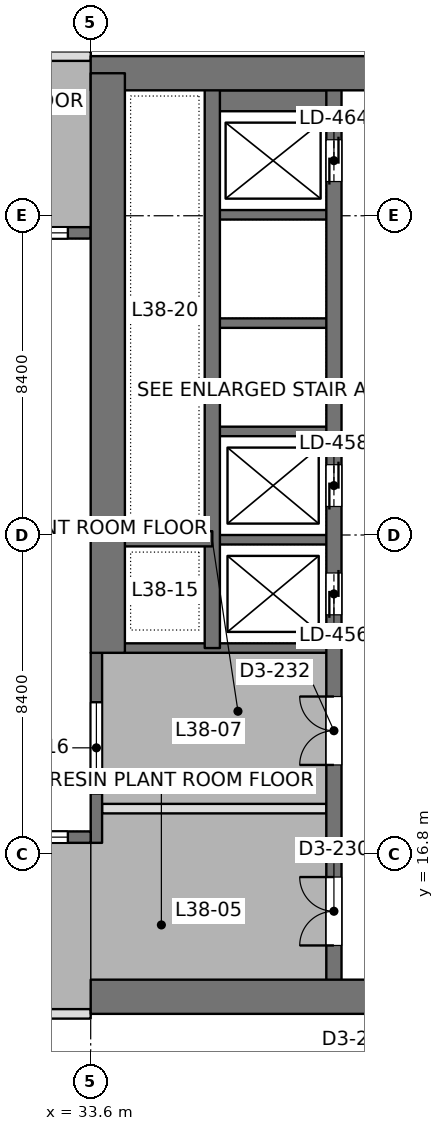
"""IFC4 building model, lengths in metres.
Left out: names, types, materials, properties, quantities, classifications, styles, units other than length and angle.
Written with IfcOpenShell. Run it as: python <this file> out.ifc"""

import sys

from ifc_helpers import new_model, si_unit, direction, frame, frame_2d, origin, place, context, subcontext, project, spatial, rectangle, extrude, element, fill, save


model = new_model("IFC4")
c1 = context("Model", 3, precision=1e-05, world=origin(), true_north=direction((0.0, 1.0)))
c2 = subcontext(c1, "Body", "Model", "MODEL_VIEW")
j1 = project(units=[si_unit("LENGTHUNIT", "METRE"), si_unit("PLANEANGLEUNIT", "RADIAN")], contexts=[c1])
p1 = place(None, origin())
s1 = spatial("IfcSite", under=j1, at=p1, CompositionType="ELEMENT")
p2 = place(p1, origin())
s2 = spatial("IfcBuilding", under=s1, at=p2, CompositionType="ELEMENT")
p3 = place(p2, frame((0.0, 0.0, 168.0)))
s3 = spatial("IfcBuildingStorey", under=s2, at=p3, CompositionType="ELEMENT", Elevation=168.0)
p4 = place(p3, frame((33.6, 13.05, 0.0), z_axis=(0.0, 0.0, 1.0), x_axis=(1.0, 0.0, 0.0)))
e1 = element("IfcWall", 1, at=p4, inside=s3, PredefinedType="SHEAR", context=c2, shape_type="SweptSolid", body=[
    extrude(rectangle(XDim=18.0, YDim=0.9, at=frame_2d((9.0, 0.0))), origin(), (0.0, 0.0, 1.0), 5.4),
])
p5 = place(p4, frame((7.25, 0.0, 0.0)))
e2 = element("IfcOpeningElement", 2, at=p5, cuts=e1, PredefinedType="OPENING", context=c2, shape_type="SweptSolid", body=[
    extrude(rectangle(XDim=1.8, YDim=2.4, at=frame_2d((0.9, 1.2))), frame((0.0, 0.46, 0.0), z_axis=(0.0, -1.0, 0.0), x_axis=(1.0, 0.0, 0.0)), (0.0, 0.0, 1.0), 0.92),
])
p6 = place(p3, frame((33.6, 37.35, 0.0), z_axis=(0.0, 0.0, 1.0), x_axis=(1.0, 0.0, 0.0)))
e3 = element("IfcWall", 3, at=p6, inside=s3, PredefinedType="SHEAR", context=c2, shape_type="SweptSolid", body=[
    extrude(rectangle(XDim=18.0, YDim=0.9, at=frame_2d((9.0, 0.0))), origin(), (0.0, 0.0, 1.0), 5.4),
])
p7 = place(p6, frame((7.25, 0.0, 0.0)))
e4 = element("IfcOpeningElement", 4, at=p7, cuts=e3, PredefinedType="OPENING", context=c2, shape_type="SweptSolid", body=[
    extrude(rectangle(XDim=1.8, YDim=2.4, at=frame_2d((0.9, 1.2))), frame((0.0, 0.46, 0.0), z_axis=(0.0, -1.0, 0.0), x_axis=(1.0, 0.0, 0.0)), (0.0, 0.0, 1.0), 0.92),
])
p8 = place(p3, frame((34.05, 22.1, 0.0), z_axis=(0.0, 0.0, 1.0), x_axis=(0.0, 1.0, 0.0)))
e5 = element("IfcWall", 5, at=p8, inside=s3, PredefinedType="SHEAR", context=c2, shape_type="SweptSolid", body=[
    extrude(rectangle(XDim=15.25, YDim=0.9, at=frame_2d((7.625, 0.0))), origin(), (0.0, 0.0, 1.0), 5.4),
])
p9 = place(p3, frame((40.0, 13.05, 0.0), z_axis=(0.0, 0.0, 1.0), x_axis=(0.0, 1.0, 0.0)))
e6 = element("IfcWall", 6, at=p9, inside=s3, PredefinedType="SHEAR", context=c2, shape_type="SweptSolid", body=[
    extrude(rectangle(XDim=24.3, YDim=0.4, at=frame_2d((12.15, 0.0))), origin(), (0.0, 0.0, 1.0), 5.4),
])
p10 = place(p9, frame((10.05, 0.0, 0.0)))
e7 = element("IfcOpeningElement", 7, at=p10, cuts=e6, PredefinedType="OPENING", context=c2, shape_type="SweptSolid", body=[
    extrude(rectangle(XDim=1.1, YDim=2.2, at=frame_2d((0.55, 1.1))), frame((0.0, 0.21, 0.0), z_axis=(0.0, -1.0, 0.0), x_axis=(1.0, 0.0, 0.0)), (0.0, 0.0, 1.0), 0.42),
])
p11 = place(p9, frame((12.9, 0.0, 0.0)))
e8 = element("IfcOpeningElement", 8, at=p11, cuts=e6, PredefinedType="OPENING", context=c2, shape_type="SweptSolid", body=[
    extrude(rectangle(XDim=1.1, YDim=2.2, at=frame_2d((0.55, 1.1))), frame((0.0, 0.21, 0.0), z_axis=(0.0, -1.0, 0.0), x_axis=(1.0, 0.0, 0.0)), (0.0, 0.0, 1.0), 0.42),
])
p12 = place(p9, frame((21.45, 0.0, 0.0)))
e9 = element("IfcOpeningElement", 9, at=p12, cuts=e6, PredefinedType="OPENING", context=c2, shape_type="SweptSolid", body=[
    extrude(rectangle(XDim=1.1, YDim=2.2, at=frame_2d((0.55, 1.1))), frame((0.0, 0.21, 0.0), z_axis=(0.0, -1.0, 0.0), x_axis=(1.0, 0.0, 0.0)), (0.0, 0.0, 1.0), 0.42),
])
p13 = place(p9, frame((6.1, 0.0, 0.0)))
e10 = element("IfcOpeningElement", 10, at=p13, cuts=e6, PredefinedType="OPENING", context=c2, shape_type="SweptSolid", body=[
    extrude(rectangle(XDim=1.8, YDim=2.4, at=frame_2d((0.9, 1.2))), frame((0.0, 0.21, 0.0), z_axis=(0.0, -1.0, 0.0), x_axis=(1.0, 0.0, 0.0)), (0.0, 0.0, 1.0), 0.42),
])
p14 = place(p9, frame((1.35, 0.0, 0.0)))
e11 = element("IfcOpeningElement", 11, at=p14, cuts=e6, PredefinedType="OPENING", context=c2, shape_type="SweptSolid", body=[
    extrude(rectangle(XDim=1.8, YDim=2.4, at=frame_2d((0.9, 1.2))), frame((0.0, 0.21, 0.0), z_axis=(0.0, -1.0, 0.0), x_axis=(1.0, 0.0, 0.0)), (0.0, 0.0, 1.0), 0.42),
])
p15 = place(p3, frame((36.8, 22.225, 0.0), z_axis=(0.0, 0.0, 1.0), x_axis=(0.0, 1.0, 0.0)))
e12 = element("IfcWall", 12, at=p15, inside=s3, PredefinedType="SHEAR", context=c2, shape_type="SweptSolid", body=[
    extrude(rectangle(XDim=15.125, YDim=0.4, at=frame_2d((7.562, 0.0))), origin(), (0.0, 0.0, 1.0), 5.4),
])
p16 = place(p3, frame((36.8, 25.1, 0.0), z_axis=(0.0, 0.0, 1.0), x_axis=(-1.0, 0.0, 0.0)))
e13 = element("IfcWall", 13, at=p16, inside=s3, PredefinedType="SHEAR", context=c2, shape_type="SweptSolid", body=[
    extrude(rectangle(XDim=2.75, YDim=0.4, at=frame_2d((1.375, 0.0))), origin(), (0.0, 0.0, 1.0), 5.4),
])
p17 = place(p3, frame((40.0, 22.225, 0.0), z_axis=(0.0, 0.0, 1.0), x_axis=(-1.0, 0.0, 0.0)))
e14 = element("IfcWall", 14, at=p17, inside=s3, PredefinedType="SHEAR", context=c2, shape_type="SweptSolid", body=[
    extrude(rectangle(XDim=5.95, YDim=0.25, at=frame_2d((2.975, 0.0))), origin(), (0.0, 0.0, 1.0), 5.4),
])
for number, where, z_axis, x_axis in (
    (15, (40.0, 25.075, 0.0), (0.0, 0.0, 1.0), (-1.0, 0.0, 0.0)),
    (16, (40.0, 27.925, 0.0), (0.0, 0.0, 1.0), (-1.0, 0.0, 0.0)),
    (17, (40.0, 30.775, 0.0), (0.0, 0.0, 1.0), (-1.0, 0.0, 0.0)),
    (18, (40.0, 33.625, 0.0), (0.0, 0.0, 1.0), (-1.0, 0.0, 0.0)),
):
    element("IfcWall", number, at=place(p3, frame(where, z_axis=z_axis, x_axis=x_axis)), inside=s3, PredefinedType="SHEAR", context=c2, shape_type="SweptSolid", body=[
        extrude(rectangle(XDim=3.2, YDim=0.25, at=frame_2d((1.6, 0.0))), origin(), (0.0, 0.0, 1.0), 5.4),
    ])
p18 = place(p3, frame((40.0, 36.625, 0.0), z_axis=(0.0, 0.0, 1.0), x_axis=(-1.0, 0.0, 0.0)))
e19 = element("IfcWall", 19, at=p18, inside=s3, PredefinedType="SHEAR", context=c2, shape_type="SweptSolid", body=[
    extrude(rectangle(XDim=3.2, YDim=0.55, at=frame_2d((1.6, 0.0))), origin(), (0.0, 0.0, 1.0), 5.4),
])
p19 = place(p3, frame((33.75, 17.1, 0.0), z_axis=(0.0, 0.0, 1.0), x_axis=(0.0, 1.0, 0.0)))
e20 = element("IfcWall", 20, at=p19, inside=s3, PredefinedType="SOLIDWALL", context=c2, shape_type="SweptSolid", body=[
    extrude(rectangle(XDim=5.0, YDim=0.3, at=frame_2d((2.5, 0.0))), origin(), (0.0, 0.0, 1.0), 5.25),
])
p20 = place(p19, frame((1.3, 0.0, 1.2)))
e21 = element("IfcOpeningElement", 21, at=p20, cuts=e20, PredefinedType="OPENING", context=c2, shape_type="SweptSolid", body=[
    extrude(rectangle(XDim=2.4, YDim=2.4, at=frame_2d((1.2, 1.2))), frame((0.0, 0.16, 0.0), z_axis=(0.0, -1.0, 0.0), x_axis=(1.0, 0.0, 0.0)), (0.0, 0.0, 1.0), 0.32),
])
p21 = place(p3, frame((25.775, 17.25, 0.0), z_axis=(0.0, 0.0, 1.0), x_axis=(1.0, 0.0, 0.0)))
e22 = element("IfcWall", 22, at=p21, inside=s3, PredefinedType="SOLIDWALL", context=c2, shape_type="SweptSolid", body=[
    extrude(rectangle(XDim=7.825, YDim=0.3, at=frame_2d((3.913, 0.0))), origin(), (0.0, 0.0, 1.0), 5.25),
])
p22 = place(p21, frame((0.025, 0.0, 1.2)))
e23 = element("IfcOpeningElement", 23, at=p22, cuts=e22, PredefinedType="OPENING", context=c2, shape_type="SweptSolid", body=[
    extrude(rectangle(XDim=3.0, YDim=2.4, at=frame_2d((1.5, 1.2))), frame((0.0, 0.16, 0.0), z_axis=(0.0, -1.0, 0.0), x_axis=(1.0, 0.0, 0.0)), (0.0, 0.0, 1.0), 0.32),
])
p23 = place(p21, frame((4.225, 0.0, 1.2)))
e24 = element("IfcOpeningElement", 24, at=p23, cuts=e22, PredefinedType="OPENING", context=c2, shape_type="SweptSolid", body=[
    extrude(rectangle(XDim=3.0, YDim=2.4, at=frame_2d((1.5, 1.2))), frame((0.0, 0.16, 0.0), z_axis=(0.0, -1.0, 0.0), x_axis=(1.0, 0.0, 0.0)), (0.0, 0.0, 1.0), 0.32),
])
p24 = place(p3, frame((25.775, 33.15, 0.0), z_axis=(0.0, 0.0, 1.0), x_axis=(1.0, 0.0, 0.0)))
e25 = element("IfcWall", 25, at=p24, inside=s3, PredefinedType="SOLIDWALL", context=c2, shape_type="SweptSolid", body=[
    extrude(rectangle(XDim=7.825, YDim=0.3, at=frame_2d((3.913, 0.0))), origin(), (0.0, 0.0, 1.0), 5.25),
])
p25 = place(p24, frame((0.025, 0.0, 1.2)))
e26 = element("IfcOpeningElement", 26, at=p25, cuts=e25, PredefinedType="OPENING", context=c2, shape_type="SweptSolid", body=[
    extrude(rectangle(XDim=3.0, YDim=2.4, at=frame_2d((1.5, 1.2))), frame((0.0, 0.16, 0.0), z_axis=(0.0, -1.0, 0.0), x_axis=(1.0, 0.0, 0.0)), (0.0, 0.0, 1.0), 0.32),
])
p26 = place(p24, frame((4.225, 0.0, 1.2)))
e27 = element("IfcOpeningElement", 27, at=p26, cuts=e25, PredefinedType="OPENING", context=c2, shape_type="SweptSolid", body=[
    extrude(rectangle(XDim=3.0, YDim=2.4, at=frame_2d((1.5, 1.2))), frame((0.0, 0.16, 0.0), z_axis=(0.0, -1.0, 0.0), x_axis=(1.0, 0.0, 0.0)), (0.0, 0.0, 1.0), 0.32),
])
p27 = place(p3, frame((33.898, 18.0, 0.0), z_axis=(0.0, 0.0, 1.0), x_axis=(1.0, 0.0, 0.0)))
e28 = element("IfcWall", 28, at=p27, inside=s3, PredefinedType="PARTITIONING", context=c2, shape_type="SweptSolid", body=[
    extrude(rectangle(XDim=5.904, YDim=0.25, at=frame_2d((2.952, 0.0))), origin(), (0.0, 0.0, 1.0), 4.75),
])
p28 = place(p3, frame((16.8, 12.6, 0.0), z_axis=(0.0, 0.0, 1.0), x_axis=(1.0, 0.0, 0.0)))
e29 = element("IfcWall", 29, at=p28, inside=s3, PredefinedType="PARTITIONING", context=c2, shape_type="SweptSolid", body=[
    extrude(rectangle(XDim=16.8, YDim=0.25, at=frame_2d((8.4, 0.0))), origin(), (0.0, 0.0, 1.0), 4.725),
])
p29 = place(p28, frame((7.4, 0.0, 0.0)))
e30 = element("IfcOpeningElement", 30, at=p29, cuts=e29, PredefinedType="OPENING", context=c2, shape_type="SweptSolid", body=[
    extrude(rectangle(XDim=2.0, YDim=2.4, at=frame_2d((1.0, 1.2))), frame((0.0, 0.135, 0.0), z_axis=(0.0, -1.0, 0.0), x_axis=(1.0, 0.0, 0.0)), (0.0, 0.0, 1.0), 0.27),
])
p30 = place(p3, frame((16.798, 37.8, 0.0), z_axis=(0.0, 0.0, 1.0), x_axis=(1.0, 0.0, 0.0)))
e31 = element("IfcWall", 31, at=p30, inside=s3, PredefinedType="PARTITIONING", context=c2, shape_type="SweptSolid", body=[
    extrude(rectangle(XDim=16.804, YDim=0.25, at=frame_2d((8.402, 0.0))), origin(), (0.0, 0.0, 1.0), 4.725),
])
p31 = place(p30, frame((7.402, 0.0, 0.0)))
e32 = element("IfcOpeningElement", 32, at=p31, cuts=e31, PredefinedType="OPENING", context=c2, shape_type="SweptSolid", body=[
    extrude(rectangle(XDim=2.0, YDim=2.4, at=frame_2d((1.0, 1.2))), frame((0.0, 0.135, 0.0), z_axis=(0.0, -1.0, 0.0), x_axis=(1.0, 0.0, 0.0)), (0.0, 0.0, 1.0), 0.27),
])
p32 = place(p20, origin())
e33 = element("IfcWindow", 33, at=p32, inside=s3, PartitioningType="SINGLE_PANEL", PredefinedType="USERDEFINED", context=c2, shape_type="SweptSolid", body=[
    extrude(rectangle(XDim=2.4, YDim=2.4, at=frame_2d((1.2, 1.2))), frame((0.0, 0.03, 0.0), z_axis=(0.0, -1.0, 0.0), x_axis=(1.0, 0.0, 0.0)), (0.0, 0.0, 1.0), 0.06),
])
fill(e21, e33)
p33 = place(p23, origin())
e34 = element("IfcWindow", 34, at=p33, inside=s3, PartitioningType="SINGLE_PANEL", PredefinedType="USERDEFINED", context=c2, shape_type="SweptSolid", body=[
    extrude(rectangle(XDim=3.0, YDim=2.4, at=frame_2d((1.5, 1.2))), frame((0.0, 0.03, 0.0), z_axis=(0.0, -1.0, 0.0), x_axis=(1.0, 0.0, 0.0)), (0.0, 0.0, 1.0), 0.06),
])
fill(e24, e34)
p34 = place(p26, origin())
e35 = element("IfcWindow", 35, at=p34, inside=s3, PartitioningType="SINGLE_PANEL", PredefinedType="USERDEFINED", context=c2, shape_type="SweptSolid", body=[
    extrude(rectangle(XDim=3.0, YDim=2.4, at=frame_2d((1.5, 1.2))), frame((0.0, 0.03, 0.0), z_axis=(0.0, -1.0, 0.0), x_axis=(1.0, 0.0, 0.0)), (0.0, 0.0, 1.0), 0.06),
])
fill(e27, e35)
p35 = place(p10, origin())
e36 = element("IfcDoor", 36, at=p35, inside=s3, OperationType="DOUBLE_DOOR_SLIDING", PredefinedType="DOOR", context=c2, shape_type="SweptSolid", body=[
    extrude(rectangle(XDim=1.1, YDim=2.2, at=frame_2d((0.55, 1.1))), frame((0.0, 0.025, 0.0), z_axis=(0.0, -1.0, 0.0), x_axis=(1.0, 0.0, 0.0)), (0.0, 0.0, 1.0), 0.05),
])
fill(e7, e36)
p36 = place(p11, origin())
e37 = element("IfcDoor", 37, at=p36, inside=s3, OperationType="DOUBLE_DOOR_SLIDING", PredefinedType="DOOR", context=c2, shape_type="SweptSolid", body=[
    extrude(rectangle(XDim=1.1, YDim=2.2, at=frame_2d((0.55, 1.1))), frame((0.0, 0.025, 0.0), z_axis=(0.0, -1.0, 0.0), x_axis=(1.0, 0.0, 0.0)), (0.0, 0.0, 1.0), 0.05),
])
fill(e8, e37)
p37 = place(p12, origin())
e38 = element("IfcDoor", 38, at=p37, inside=s3, OperationType="DOUBLE_DOOR_SLIDING", PredefinedType="DOOR", context=c2, shape_type="SweptSolid", body=[
    extrude(rectangle(XDim=1.1, YDim=2.2, at=frame_2d((0.55, 1.1))), frame((0.0, 0.025, 0.0), z_axis=(0.0, -1.0, 0.0), x_axis=(1.0, 0.0, 0.0)), (0.0, 0.0, 1.0), 0.05),
])
fill(e9, e38)
p38 = place(p13, origin())
e39 = element("IfcDoor", 39, at=p38, inside=s3, OperationType="DOUBLE_DOOR_SINGLE_SWING", PredefinedType="DOOR", context=c2, shape_type="SweptSolid", body=[
    extrude(rectangle(XDim=1.8, YDim=2.4, at=frame_2d((0.9, 1.2))), frame((0.0, 0.025, 0.0), z_axis=(0.0, -1.0, 0.0), x_axis=(1.0, 0.0, 0.0)), (0.0, 0.0, 1.0), 0.05),
])
fill(e10, e39)
p39 = place(p14, origin())
e40 = element("IfcDoor", 40, at=p39, inside=s3, OperationType="DOUBLE_DOOR_SINGLE_SWING", PredefinedType="DOOR", context=c2, shape_type="SweptSolid", body=[
    extrude(rectangle(XDim=1.8, YDim=2.4, at=frame_2d((0.9, 1.2))), frame((0.0, 0.025, 0.0), z_axis=(0.0, -1.0, 0.0), x_axis=(1.0, 0.0, 0.0)), (0.0, 0.0, 1.0), 0.05),
])
fill(e11, e40)
save(model, sys.argv[1])
